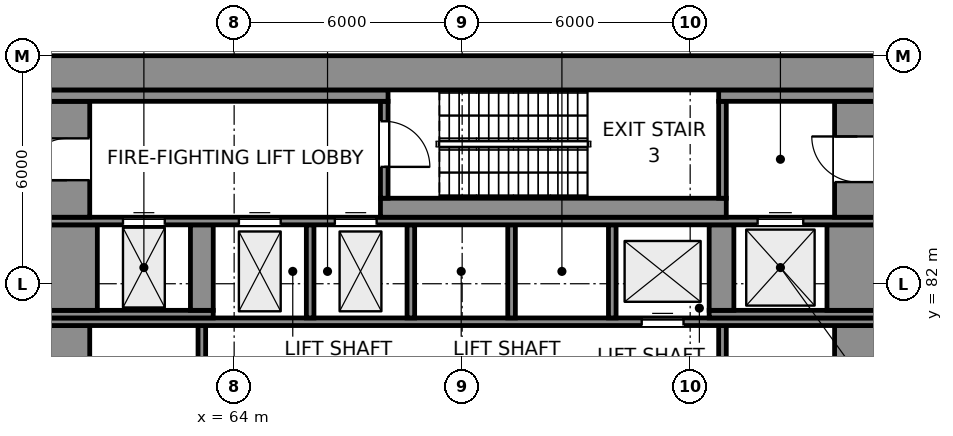
"""IFC4 building model, lengths in metres.
Left out: names, types, materials, properties, quantities, classifications, styles, units other than length and angle.
Written with IfcOpenShell. Run it as: python <this file> out.ifc"""

import sys

from ifc_helpers import new_model, si_unit, direction, frame, frame_2d, origin, place, context, subcontext, project, spatial, rectangle, extrude, element, fill, save


model = new_model("IFC4")
c1 = context("Model", 3, precision=1e-05, world=origin(), true_north=direction((0.0, 1.0)))
c2 = subcontext(c1, "Body", "Model", "MODEL_VIEW")
j1 = project(units=[si_unit("LENGTHUNIT", "METRE"), si_unit("PLANEANGLEUNIT", "RADIAN")], contexts=[c1])
p1 = place(None, origin())
s1 = spatial("IfcSite", under=j1, at=p1, CompositionType="ELEMENT")
p2 = place(p1, origin())
s2 = spatial("IfcBuilding", under=s1, at=p2, CompositionType="ELEMENT")
p3 = place(p2, frame((0.0, 0.0, 23.0)))
s3 = spatial("IfcBuildingStorey", under=s2, at=p3, CompositionType="ELEMENT", Elevation=23.0)
for number, where, z_axis, x_axis in (
    (1, (59.6, 72.2, 0.0), (0.0, 0.0, 1.0), (0.0, 1.0, 0.0)),
    (2, (80.4, 72.2, 0.0), (0.0, 0.0, 1.0), (0.0, 1.0, 0.0)),
):
    element("IfcWall", number, at=place(p3, frame(where, z_axis=z_axis, x_axis=x_axis)), inside=s3, PredefinedType="SHEAR", context=c2, shape_type="SweptSolid", body=[
        extrude(rectangle(XDim=8.7, YDim=1.2, at=frame_2d((4.35, 0.0))), origin(), (0.0, 0.0, 1.0), 6.0),
    ])
for number, where, z_axis, x_axis in (
    (3, (63.15, 77.7, 0.0), (0.0, 0.0, 1.0), (0.0, 1.0, 0.0)),
    (4, (76.85, 77.7, 0.0), (0.0, 0.0, 1.0), (0.0, 1.0, 0.0)),
):
    element("IfcWall", number, at=place(p3, frame(where, z_axis=z_axis, x_axis=x_axis)), inside=s3, PredefinedType="SHEAR", context=c2, shape_type="SweptSolid", body=[
        extrude(rectangle(XDim=3.2, YDim=0.2, at=frame_2d((1.6, 0.0))), origin(), (0.0, 0.0, 1.0), 6.0),
    ])
p4 = place(p3, frame((59.0, 81.0, 0.0), z_axis=(0.0, 0.0, 1.0), x_axis=(1.0, 0.0, 0.0)))
e5 = element("IfcWall", 5, at=p4, inside=s3, PredefinedType="SHEAR", context=c2, shape_type="SweptSolid", body=[
    extrude(rectangle(XDim=22.0, YDim=0.2, at=frame_2d((11.0, 0.0))), origin(), (0.0, 0.0, 1.0), 6.0),
])
p5 = place(p4, frame((15.725, 0.0, 0.0)))
e6 = element("IfcOpeningElement", 6, at=p5, cuts=e5, PredefinedType="OPENING", context=c2, shape_type="SweptSolid", body=[
    extrude(rectangle(XDim=1.1, YDim=2.1, at=frame_2d((0.55, 1.05))), frame((0.0, 0.11, 0.0), z_axis=(0.0, -1.0, 0.0), x_axis=(1.0, 0.0, 0.0)), (0.0, 0.0, 1.0), 0.22),
])
p6 = place(p3, frame((59.0, 81.2, 0.0), z_axis=(0.0, 0.0, 1.0), x_axis=(1.0, 0.0, 0.0)))
e7 = element("IfcWall", 7, at=p6, inside=s3, PredefinedType="SHEAR", context=c2, shape_type="SweptSolid", body=[
    extrude(rectangle(XDim=4.45, YDim=0.2, at=frame_2d((2.225, 0.0))), origin(), (0.0, 0.0, 1.0), 6.0),
])
for number, where, z_axis, x_axis in (
    (8, (66.0, 81.1, 0.0), (0.0, 0.0, 1.0), (0.0, 1.0, 0.0)),
    (9, (68.65, 81.1, 0.0), (0.0, 0.0, 1.0), (0.0, 1.0, 0.0)),
    (10, (71.3, 81.1, 0.0), (0.0, 0.0, 1.0), (0.0, 1.0, 0.0)),
    (11, (73.95, 81.1, 0.0), (0.0, 0.0, 1.0), (0.0, 1.0, 0.0)),
):
    element("IfcWall", number, at=place(p3, frame(where, z_axis=z_axis, x_axis=x_axis)), inside=s3, PredefinedType="SHEAR", context=c2, shape_type="SweptSolid", body=[
        extrude(rectangle(XDim=2.45, YDim=0.2, at=frame_2d((1.225, 0.0))), origin(), (0.0, 0.0, 1.0), 6.0),
    ])
p7 = place(p3, frame((76.5, 81.2, 0.0), z_axis=(0.0, 0.0, 1.0), x_axis=(1.0, 0.0, 0.0)))
e12 = element("IfcWall", 12, at=p7, inside=s3, PredefinedType="SHEAR", context=c2, shape_type="SweptSolid", body=[
    extrude(rectangle(XDim=4.5, YDim=0.2, at=frame_2d((2.25, 0.0))), origin(), (0.0, 0.0, 1.0), 6.0),
])
p8 = place(p3, frame((59.7, 81.3, 0.0), z_axis=(0.0, 0.0, 1.0), x_axis=(0.0, 1.0, 0.0)))
e13 = element("IfcWall", 13, at=p8, inside=s3, PredefinedType="SHEAR", context=c2, shape_type="SweptSolid", body=[
    extrude(rectangle(XDim=2.25, YDim=1.4, at=frame_2d((1.125, 0.0))), origin(), (0.0, 0.0, 1.0), 6.0),
])
p9 = place(p3, frame((63.15, 81.3, 0.0), z_axis=(0.0, 0.0, 1.0), x_axis=(0.0, 1.0, 0.0)))
e14 = element("IfcWall", 14, at=p9, inside=s3, PredefinedType="SHEAR", context=c2, shape_type="SweptSolid", body=[
    extrude(rectangle(XDim=2.25, YDim=0.6, at=frame_2d((1.125, 0.0))), origin(), (0.0, 0.0, 1.0), 6.0),
])
p10 = place(p3, frame((76.825, 81.3, 0.0), z_axis=(0.0, 0.0, 1.0), x_axis=(0.0, 1.0, 0.0)))
e15 = element("IfcWall", 15, at=p10, inside=s3, PredefinedType="SHEAR", context=c2, shape_type="SweptSolid", body=[
    extrude(rectangle(XDim=2.25, YDim=0.65, at=frame_2d((1.125, 0.0))), origin(), (0.0, 0.0, 1.0), 6.0),
])
p11 = place(p3, frame((80.3, 81.3, 0.0), z_axis=(0.0, 0.0, 1.0), x_axis=(0.0, 1.0, 0.0)))
e16 = element("IfcWall", 16, at=p11, inside=s3, PredefinedType="SHEAR", context=c2, shape_type="SweptSolid", body=[
    extrude(rectangle(XDim=2.25, YDim=1.4, at=frame_2d((1.125, 0.0))), origin(), (0.0, 0.0, 1.0), 6.0),
])
p12 = place(p3, frame((59.0, 83.65, 0.0), z_axis=(0.0, 0.0, 1.0), x_axis=(1.0, 0.0, 0.0)))
e17 = element("IfcWall", 17, at=p12, inside=s3, PredefinedType="SHEAR", context=c2, shape_type="SweptSolid", body=[
    extrude(rectangle(XDim=22.0, YDim=0.2, at=frame_2d((11.0, 0.0))), origin(), (0.0, 0.0, 1.0), 6.0),
])
p13 = place(p12, frame((5.125, 0.0, 0.0)))
e18 = element("IfcOpeningElement", 18, at=p13, cuts=e17, PredefinedType="OPENING", context=c2, shape_type="SweptSolid", body=[
    extrude(rectangle(XDim=1.1, YDim=2.1, at=frame_2d((0.55, 1.05))), frame((0.0, 0.11, 0.0), z_axis=(0.0, -1.0, 0.0), x_axis=(1.0, 0.0, 0.0)), (0.0, 0.0, 1.0), 0.22),
])
p14 = place(p12, frame((7.65, 0.0, 0.0)))
e19 = element("IfcOpeningElement", 19, at=p14, cuts=e17, PredefinedType="OPENING", context=c2, shape_type="SweptSolid", body=[
    extrude(rectangle(XDim=1.1, YDim=2.1, at=frame_2d((0.55, 1.05))), frame((0.0, 0.11, 0.0), z_axis=(0.0, -1.0, 0.0), x_axis=(1.0, 0.0, 0.0)), (0.0, 0.0, 1.0), 0.22),
])
p15 = place(p12, frame((18.775, 0.0, 0.0)))
e20 = element("IfcOpeningElement", 20, at=p15, cuts=e17, PredefinedType="OPENING", context=c2, shape_type="SweptSolid", body=[
    extrude(rectangle(XDim=1.2, YDim=2.1, at=frame_2d((0.6, 1.05))), frame((0.0, 0.11, 0.0), z_axis=(0.0, -1.0, 0.0), x_axis=(1.0, 0.0, 0.0)), (0.0, 0.0, 1.0), 0.22),
])
p16 = place(p12, frame((2.075, 0.0, 0.0)))
e21 = element("IfcOpeningElement", 21, at=p16, cuts=e17, PredefinedType="OPENING", context=c2, shape_type="SweptSolid", body=[
    extrude(rectangle(XDim=1.1, YDim=2.1, at=frame_2d((0.55, 1.05))), frame((0.0, 0.11, 0.0), z_axis=(0.0, -1.0, 0.0), x_axis=(1.0, 0.0, 0.0)), (0.0, 0.0, 1.0), 0.22),
])
p17 = place(p3, frame((59.6, 83.75, 0.0), z_axis=(0.0, 0.0, 1.0), x_axis=(0.0, 1.0, 0.0)))
e22 = element("IfcWall", 22, at=p17, inside=s3, PredefinedType="SHEAR", context=c2, shape_type="SweptSolid", body=[
    extrude(rectangle(XDim=3.05, YDim=1.2, at=frame_2d((1.525, 0.0))), origin(), (0.0, 0.0, 1.0), 6.0),
])
p18 = place(p17, frame((0.975, 0.0, 0.0)))
e23 = element("IfcOpeningElement", 23, at=p18, cuts=e22, PredefinedType="OPENING", context=c2, shape_type="SweptSolid", body=[
    extrude(rectangle(XDim=1.1, YDim=2.1, at=frame_2d((0.55, 1.05))), frame((0.0, 0.61, 0.0), z_axis=(0.0, -1.0, 0.0), x_axis=(1.0, 0.0, 0.0)), (0.0, 0.0, 1.0), 1.22),
])
p19 = place(p3, frame((67.85, 84.0, 0.0), z_axis=(0.0, 0.0, 1.0), x_axis=(1.0, 0.0, 0.0)))
e24 = element("IfcWall", 24, at=p19, inside=s3, PredefinedType="SHEAR", context=c2, shape_type="SweptSolid", body=[
    extrude(rectangle(XDim=9.1, YDim=0.5, at=frame_2d((4.55, 0.0))), origin(), (0.0, 0.0, 1.0), 6.0),
])
p20 = place(p3, frame((80.4, 83.75, 0.0), z_axis=(0.0, 0.0, 1.0), x_axis=(0.0, 1.0, 0.0)))
e25 = element("IfcWall", 25, at=p20, inside=s3, PredefinedType="SHEAR", context=c2, shape_type="SweptSolid", body=[
    extrude(rectangle(XDim=3.05, YDim=1.2, at=frame_2d((1.525, 0.0))), origin(), (0.0, 0.0, 1.0), 6.0),
])
p21 = place(p20, frame((0.925, 0.0, 0.0)))
e26 = element("IfcOpeningElement", 26, at=p21, cuts=e25, PredefinedType="OPENING", context=c2, shape_type="SweptSolid", body=[
    extrude(rectangle(XDim=1.2, YDim=2.1, at=frame_2d((0.6, 1.05))), frame((0.0, 0.61, 0.0), z_axis=(0.0, -1.0, 0.0), x_axis=(1.0, 0.0, 0.0)), (0.0, 0.0, 1.0), 1.22),
])
p22 = place(p3, frame((67.95, 84.25, 0.0), z_axis=(0.0, 0.0, 1.0), x_axis=(0.0, 1.0, 0.0)))
e27 = element("IfcWall", 27, at=p22, inside=s3, PredefinedType="SHEAR", context=c2, shape_type="SweptSolid", body=[
    extrude(rectangle(XDim=2.55, YDim=0.2, at=frame_2d((1.275, 0.0))), origin(), (0.0, 0.0, 1.0), 6.0),
])
p23 = place(p22, frame((0.825, 0.0, 0.0)))
e28 = element("IfcOpeningElement", 28, at=p23, cuts=e27, PredefinedType="OPENING", context=c2, shape_type="SweptSolid", body=[
    extrude(rectangle(XDim=1.2, YDim=2.1, at=frame_2d((0.6, 1.05))), frame((0.0, 0.11, 0.0), z_axis=(0.0, -1.0, 0.0), x_axis=(1.0, 0.0, 0.0)), (0.0, 0.0, 1.0), 0.22),
])
p24 = place(p3, frame((76.85, 84.25, 0.0), z_axis=(0.0, 0.0, 1.0), x_axis=(0.0, 1.0, 0.0)))
e29 = element("IfcWall", 29, at=p24, inside=s3, PredefinedType="SHEAR", context=c2, shape_type="SweptSolid", body=[
    extrude(rectangle(XDim=2.55, YDim=0.2, at=frame_2d((1.275, 0.0))), origin(), (0.0, 0.0, 1.0), 6.0),
])
p25 = place(p3, frame((59.0, 86.95, 0.0), z_axis=(0.0, 0.0, 1.0), x_axis=(1.0, 0.0, 0.0)))
e30 = element("IfcWall", 30, at=p25, inside=s3, PredefinedType="SHEAR", context=c2, shape_type="SweptSolid", body=[
    extrude(rectangle(XDim=9.05, YDim=0.3, at=frame_2d((4.525, 0.0))), origin(), (0.0, 0.0, 1.0), 6.0),
])
p26 = place(p3, frame((76.75, 86.95, 0.0), z_axis=(0.0, 0.0, 1.0), x_axis=(1.0, 0.0, 0.0)))
e31 = element("IfcWall", 31, at=p26, inside=s3, PredefinedType="SHEAR", context=c2, shape_type="SweptSolid", body=[
    extrude(rectangle(XDim=4.25, YDim=0.3, at=frame_2d((2.125, 0.0))), origin(), (0.0, 0.0, 1.0), 6.0),
])
p27 = place(p3, frame((59.0, 87.55, 0.0), z_axis=(0.0, 0.0, 1.0), x_axis=(1.0, 0.0, 0.0)))
e32 = element("IfcWall", 32, at=p27, inside=s3, PredefinedType="SHEAR", context=c2, shape_type="SweptSolid", body=[
    extrude(rectangle(XDim=22.0, YDim=0.9, at=frame_2d((11.0, 0.0))), origin(), (0.0, 0.0, 1.0), 6.0),
])
p28 = place(p23, frame((1.2, 0.0, 0.0), z_axis=(0.0, 0.0, 1.0), x_axis=(-1.0, 0.0, 0.0)))
e33 = element("IfcDoor", 33, at=p28, inside=s3, OperationType="SINGLE_SWING_RIGHT", PredefinedType="DOOR", context=c2, shape_type="SweptSolid", body=[
    extrude(rectangle(XDim=1.2, YDim=2.1, at=frame_2d((0.6, 1.05))), frame((0.0, 0.025, 0.0), z_axis=(0.0, -1.0, 0.0), x_axis=(1.0, 0.0, 0.0)), (0.0, 0.0, 1.0), 0.05),
])
fill(e28, e33)
p29 = place(p18, origin())
e34 = element("IfcDoor", 34, at=p29, inside=s3, OperationType="SINGLE_SWING_LEFT", PredefinedType="DOOR", context=c2, shape_type="SweptSolid", body=[
    extrude(rectangle(XDim=1.1, YDim=2.1, at=frame_2d((0.55, 1.05))), frame((0.0, 0.025, 0.0), z_axis=(0.0, -1.0, 0.0), x_axis=(1.0, 0.0, 0.0)), (0.0, 0.0, 1.0), 0.05),
])
fill(e23, e34)
p30 = place(p21, origin())
e35 = element("IfcDoor", 35, at=p30, inside=s3, OperationType="SINGLE_SWING_RIGHT", PredefinedType="DOOR", context=c2, shape_type="SweptSolid", body=[
    extrude(rectangle(XDim=1.2, YDim=2.1, at=frame_2d((0.6, 1.05))), frame((0.0, 0.025, 0.0), z_axis=(0.0, -1.0, 0.0), x_axis=(1.0, 0.0, 0.0)), (0.0, 0.0, 1.0), 0.05),
])
fill(e26, e35)
p31 = place(p13, origin())
e36 = element("IfcDoor", 36, at=p31, inside=s3, OperationType="DOUBLE_DOOR_SLIDING", PredefinedType="DOOR", context=c2, shape_type="SweptSolid", body=[
    extrude(rectangle(XDim=1.1, YDim=2.1, at=frame_2d((0.55, 1.05))), frame((0.0, 0.025, 0.0), z_axis=(0.0, -1.0, 0.0), x_axis=(1.0, 0.0, 0.0)), (0.0, 0.0, 1.0), 0.05),
])
fill(e18, e36)
p32 = place(p14, origin())
e37 = element("IfcDoor", 37, at=p32, inside=s3, OperationType="DOUBLE_DOOR_SLIDING", PredefinedType="DOOR", context=c2, shape_type="SweptSolid", body=[
    extrude(rectangle(XDim=1.1, YDim=2.1, at=frame_2d((0.55, 1.05))), frame((0.0, 0.025, 0.0), z_axis=(0.0, -1.0, 0.0), x_axis=(1.0, 0.0, 0.0)), (0.0, 0.0, 1.0), 0.05),
])
fill(e19, e37)
p33 = place(p5, origin())
e38 = element("IfcDoor", 38, at=p33, inside=s3, OperationType="DOUBLE_DOOR_SLIDING", PredefinedType="DOOR", context=c2, shape_type="SweptSolid", body=[
    extrude(rectangle(XDim=1.1, YDim=2.1, at=frame_2d((0.55, 1.05))), frame((0.0, 0.025, 0.0), z_axis=(0.0, -1.0, 0.0), x_axis=(1.0, 0.0, 0.0)), (0.0, 0.0, 1.0), 0.05),
])
fill(e6, e38)
p34 = place(p15, origin())
e39 = element("IfcDoor", 39, at=p34, inside=s3, OperationType="DOUBLE_DOOR_SLIDING", PredefinedType="DOOR", context=c2, shape_type="SweptSolid", body=[
    extrude(rectangle(XDim=1.2, YDim=2.1, at=frame_2d((0.6, 1.05))), frame((0.0, 0.025, 0.0), z_axis=(0.0, -1.0, 0.0), x_axis=(1.0, 0.0, 0.0)), (0.0, 0.0, 1.0), 0.05),
])
fill(e20, e39)
p35 = place(p16, origin())
e40 = element("IfcDoor", 40, at=p35, inside=s3, OperationType="DOUBLE_DOOR_SLIDING", PredefinedType="DOOR", context=c2, shape_type="SweptSolid", body=[
    extrude(rectangle(XDim=1.1, YDim=2.1, at=frame_2d((0.55, 1.05))), frame((0.0, 0.025, 0.0), z_axis=(0.0, -1.0, 0.0), x_axis=(1.0, 0.0, 0.0)), (0.0, 0.0, 1.0), 0.05),
])
fill(e21, e40)
save(model, sys.argv[1])
